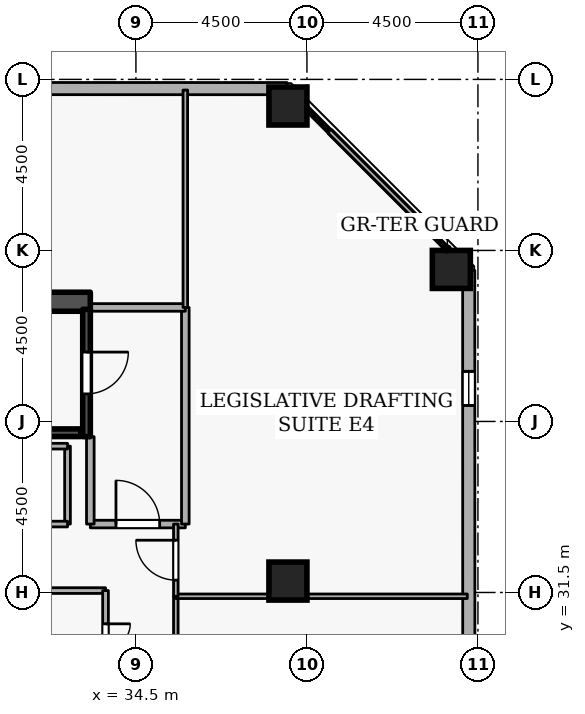
"""IFC4 building model, lengths in metres.
Left out: names, types, materials, properties, quantities, classifications, styles, units other than length and angle.
Written with IfcOpenShell. Run it as: python <this file> out.ifc"""

import sys

from ifc_helpers import new_model, si_unit, direction, frame, frame_2d, origin, origin_2d, place, context, subcontext, project, spatial, rectangle, extrude, element, fill, save


model = new_model("IFC4")
c1 = context("Model", 3, precision=1e-05, world=origin(), true_north=direction((0.0, 1.0)))
c2 = subcontext(c1, "Body", "Model", "MODEL_VIEW")
j1 = project(units=[si_unit("LENGTHUNIT", "METRE"), si_unit("PLANEANGLEUNIT", "RADIAN")], contexts=[c1])
p1 = place(None, origin())
s1 = spatial("IfcSite", under=j1, at=p1, CompositionType="ELEMENT")
p2 = place(p1, origin())
s2 = spatial("IfcBuilding", under=s1, at=p2, CompositionType="ELEMENT")
p3 = place(p2, frame((0.0, 0.0, 247.5)))
s3 = spatial("IfcBuildingStorey", under=s2, at=p3, CompositionType="ELEMENT", Elevation=247.5)
p4 = place(p3, frame((17.7, 39.15, 0.0), z_axis=(0.0, 0.0, 1.0), x_axis=(1.0, 0.0, 0.0)))
e1 = element("IfcWall", 1, at=p4, inside=s3, PredefinedType="SHEAR", context=c2, shape_type="SweptSolid", body=[
    extrude(rectangle(XDim=15.6, YDim=0.5, at=frame_2d((7.8, 0.0))), origin(), (0.0, 0.0, 1.0), 3.6),
])
for number, where, z_axis, x_axis in (
    (2, (42.8, 40.0, 0.0), (0.0, 0.0, 1.0), (1.0, 0.0, 0.0)),
    (3, (38.5, 44.3, 0.0), (0.0, 0.0, 1.0), (1.0, 0.0, 0.0)),
    (4, (38.5, 31.8, 0.0), (0.0, 0.0, 1.0), (1.0, 0.0, 0.0)),
):
    element("IfcColumn", number, at=place(p3, frame(where, z_axis=z_axis, x_axis=x_axis)), inside=s3, PredefinedType="COLUMN", context=c2, shape_type="SweptSolid", body=[
        extrude(rectangle(XDim=1.0, YDim=1.0, at=origin_2d()), origin(), (0.0, 0.0, 1.0), 3.6),
    ])
p5 = place(p3, frame((43.265, 5.819, 0.0), z_axis=(0.0, 0.0, 1.0), x_axis=(-0.000214431216, 0.99999997701, 0.0)))
e5 = element("IfcWall", 5, at=p5, inside=s3, PredefinedType="STANDARD", context=c2, shape_type="SweptSolid", body=[
    extrude(rectangle(XDim=34.156, YDim=0.32, at=frame_2d((17.078, 0.0))), origin(), (0.0, 0.0, 1.0), 2.7),
])
p6 = place(p5, frame((1.8, 0.0, 0.72)))
e6 = element("IfcOpeningElement", 6, at=p6, cuts=e5, PredefinedType="OPENING", context=c2, shape_type="SweptSolid", body=[
    extrude(rectangle(XDim=0.9, YDim=1.75, at=frame_2d((0.45, 0.875))), frame((0.0, 0.17, 0.0), z_axis=(0.0, -1.0, 0.0), x_axis=(1.0, 0.0, 0.0)), (0.0, 0.0, 1.0), 0.34),
])
p7 = place(p5, frame((11.4, 0.0, 0.72)))
e7 = element("IfcOpeningElement", 7, at=p7, cuts=e5, PredefinedType="OPENING", context=c2, shape_type="SweptSolid", body=[
    extrude(rectangle(XDim=0.9, YDim=1.75, at=frame_2d((0.45, 0.875))), frame((0.0, 0.17, 0.0), z_axis=(0.0, -1.0, 0.0), x_axis=(1.0, 0.0, 0.0)), (0.0, 0.0, 1.0), 0.34),
])
p8 = place(p5, frame((16.2, 0.0, 0.72)))
e8 = element("IfcOpeningElement", 8, at=p8, cuts=e5, PredefinedType="OPENING", context=c2, shape_type="SweptSolid", body=[
    extrude(rectangle(XDim=0.9, YDim=1.75, at=frame_2d((0.45, 0.875))), frame((0.0, 0.17, 0.0), z_axis=(0.0, -1.0, 0.0), x_axis=(1.0, 0.0, 0.0)), (0.0, 0.0, 1.0), 0.34),
])
p9 = place(p5, frame((30.6, 0.0, 0.72)))
e9 = element("IfcOpeningElement", 9, at=p9, cuts=e5, PredefinedType="OPENING", context=c2, shape_type="SweptSolid", body=[
    extrude(rectangle(XDim=0.9, YDim=1.75, at=frame_2d((0.45, 0.875))), frame((0.0, 0.17, 0.0), z_axis=(0.0, -1.0, 0.0), x_axis=(1.0, 0.0, 0.0)), (0.0, 0.0, 1.0), 0.34),
])
p10 = place(p3, frame((38.475, 44.757, 0.0), z_axis=(0.0, 0.0, 1.0), x_axis=(-0.99999997701, 0.000214431216, 0.0)))
e10 = element("IfcWall", 10, at=p10, inside=s3, PredefinedType="STANDARD", context=c2, shape_type="SweptSolid", body=[
    extrude(rectangle(XDim=34.156, YDim=0.32, at=frame_2d((17.078, 0.0))), origin(), (0.0, 0.0, 1.0), 2.7),
])
p11 = place(p10, frame((6.6, 0.0, 0.72)))
e11 = element("IfcOpeningElement", 11, at=p11, cuts=e10, PredefinedType="OPENING", context=c2, shape_type="SweptSolid", body=[
    extrude(rectangle(XDim=0.9, YDim=1.75, at=frame_2d((0.45, 0.875))), frame((0.0, 0.17, 0.0), z_axis=(0.0, -1.0, 0.0), x_axis=(1.0, 0.0, 0.0)), (0.0, 0.0, 1.0), 0.34),
])
p12 = place(p10, frame((16.2, 0.0, 0.72)))
e12 = element("IfcOpeningElement", 12, at=p12, cuts=e10, PredefinedType="OPENING", context=c2, shape_type="SweptSolid", body=[
    extrude(rectangle(XDim=0.9, YDim=1.75, at=frame_2d((0.45, 0.875))), frame((0.0, 0.17, 0.0), z_axis=(0.0, -1.0, 0.0), x_axis=(1.0, 0.0, 0.0)), (0.0, 0.0, 1.0), 0.34),
])
p13 = place(p10, frame((21.0, 0.0, 0.72)))
e13 = element("IfcOpeningElement", 13, at=p13, cuts=e10, PredefinedType="OPENING", context=c2, shape_type="SweptSolid", body=[
    extrude(rectangle(XDim=0.9, YDim=1.75, at=frame_2d((0.45, 0.875))), frame((0.0, 0.17, 0.0), z_axis=(0.0, -1.0, 0.0), x_axis=(1.0, 0.0, 0.0)), (0.0, 0.0, 1.0), 0.34),
])
p14 = place(p10, frame((30.6, 0.0, 0.72)))
e14 = element("IfcOpeningElement", 14, at=p14, cuts=e10, PredefinedType="OPENING", context=c2, shape_type="SweptSolid", body=[
    extrude(rectangle(XDim=0.9, YDim=1.75, at=frame_2d((0.45, 0.875))), frame((0.0, 0.17, 0.0), z_axis=(0.0, -1.0, 0.0), x_axis=(1.0, 0.0, 0.0)), (0.0, 0.0, 1.0), 0.34),
])
p15 = place(p3, frame((33.2, 38.95, 0.0), z_axis=(0.0, 0.0, 1.0), x_axis=(0.0, -1.0, 0.0)))
e15 = element("IfcWall", 15, at=p15, inside=s3, PredefinedType="SHEAR", context=c2, shape_type="SweptSolid", body=[
    extrude(rectangle(XDim=3.35, YDim=0.2, at=frame_2d((1.675, 0.0))), origin(), (0.0, 0.0, 1.0), 3.6),
])
p16 = place(p15, frame((1.125, 0.0, 0.0)))
e16 = element("IfcOpeningElement", 16, at=p16, cuts=e15, PredefinedType="OPENING", context=c2, shape_type="SweptSolid", body=[
    extrude(rectangle(XDim=1.1, YDim=2.1, at=frame_2d((0.55, 1.05))), frame((0.0, 0.11, 0.0), z_axis=(0.0, -1.0, 0.0), x_axis=(1.0, 0.0, 0.0)), (0.0, 0.0, 1.0), 0.22),
])
p17 = place(p3, frame((25.95, 35.703, 0.0), z_axis=(0.0, 0.0, 1.0), x_axis=(1.0, 0.0, 0.0)))
e17 = element("IfcWall", 17, at=p17, inside=s3, PredefinedType="SHEAR", context=c2, shape_type="SweptSolid", body=[
    extrude(rectangle(XDim=7.1, YDim=0.2, at=frame_2d((3.55, 0.0))), origin(), (0.0, 0.0, 1.0), 3.6),
])
p18 = place(p3, frame((33.3, 33.3, 0.0), z_axis=(0.0, 0.0, 1.0), x_axis=(1.0, 0.0, 0.0)))
e18 = element("IfcWall", 18, at=p18, inside=s3, PredefinedType="STANDARD", context=c2, shape_type="SweptSolid", body=[
    extrude(rectangle(XDim=2.5, YDim=0.2, at=frame_2d((1.25, 0.0))), origin(), (0.0, 0.0, 1.0), 3.34),
])
p19 = place(p18, frame((0.675, 0.0, 0.0)))
e19 = element("IfcOpeningElement", 19, at=p19, cuts=e18, PredefinedType="OPENING", context=c2, shape_type="SweptSolid", body=[
    extrude(rectangle(XDim=1.15, YDim=2.1, at=frame_2d((0.575, 1.05))), frame((0.0, 0.11, 0.0), z_axis=(0.0, -1.0, 0.0), x_axis=(1.0, 0.0, 0.0)), (0.0, 0.0, 1.0), 0.22),
])
p20 = place(p3, frame((35.8, 33.3, 0.0), z_axis=(0.0, 0.0, 1.0), x_axis=(0.0, 1.0, 0.0)))
e20 = element("IfcWall", 20, at=p20, inside=s3, PredefinedType="STANDARD", context=c2, shape_type="SweptSolid", body=[
    extrude(rectangle(XDim=5.7, YDim=0.2, at=frame_2d((2.85, 0.0))), origin(), (0.0, 0.0, 1.0), 3.34),
])
p21 = place(p3, frame((35.8, 39.0, 0.0), z_axis=(0.0, 0.0, 1.0), x_axis=(-1.0, 0.0, 0.0)))
e21 = element("IfcWall", 21, at=p21, inside=s3, PredefinedType="STANDARD", context=c2, shape_type="SweptSolid", body=[
    extrude(rectangle(XDim=2.5, YDim=0.2, at=frame_2d((1.25, 0.0))), origin(), (0.0, 0.0, 1.0), 3.34),
])
p22 = place(p3, frame((33.3, 35.6, 0.0), z_axis=(0.0, 0.0, 1.0), x_axis=(0.0, -1.0, 0.0)))
e22 = element("IfcWall", 22, at=p22, inside=s3, PredefinedType="STANDARD", context=c2, shape_type="SweptSolid", body=[
    extrude(rectangle(XDim=2.3, YDim=0.2, at=frame_2d((1.15, 0.0))), origin(), (0.0, 0.0, 1.0), 2.545),
])
p23 = place(p3, frame((32.7, 35.35, 0.0), z_axis=(0.0, 0.0, 1.0), x_axis=(0.0, -1.0, 0.0)))
e23 = element("IfcWall", 23, at=p23, inside=s3, PredefinedType="PARTITIONING", context=c2, shape_type="SweptSolid", body=[
    extrude(rectangle(XDim=2.05, YDim=0.15, at=frame_2d((1.025, 0.0))), origin(), (0.0, 0.0, 1.0), 2.545),
])
p24 = place(p3, frame((32.7, 33.3, 0.0), z_axis=(0.0, 0.0, 1.0), x_axis=(-1.0, 0.0, 0.0)))
e24 = element("IfcWall", 24, at=p24, inside=s3, PredefinedType="PARTITIONING", context=c2, shape_type="SweptSolid", body=[
    extrude(rectangle(XDim=2.35, YDim=0.15, at=frame_2d((1.175, 0.0))), origin(), (0.0, 0.0, 1.0), 3.34),
])
p25 = place(p24, frame((0.715, 0.0, 0.0)))
e25 = element("IfcOpeningElement", 25, at=p25, cuts=e24, PredefinedType="OPENING", context=c2, shape_type="SweptSolid", body=[
    extrude(rectangle(XDim=0.92, YDim=2.08, at=frame_2d((0.46, 1.04))), frame((0.0, 0.085, 0.0), z_axis=(0.0, -1.0, 0.0), x_axis=(1.0, 0.0, 0.0)), (0.0, 0.0, 1.0), 0.17),
])
p26 = place(p3, frame((30.35, 35.35, 0.0), z_axis=(0.0, 0.0, 1.0), x_axis=(1.0, 0.0, 0.0)))
e26 = element("IfcWall", 26, at=p26, inside=s3, PredefinedType="PARTITIONING", context=c2, shape_type="SweptSolid", body=[
    extrude(rectangle(XDim=2.35, YDim=0.15, at=frame_2d((1.175, 0.0))), origin(), (0.0, 0.0, 1.0), 3.34),
])
p27 = place(p3, frame((35.55, 26.6, 0.0), z_axis=(0.0, 0.0, 1.0), x_axis=(0.0, 1.0, 0.0)))
e27 = element("IfcWall", 27, at=p27, inside=s3, PredefinedType="PARTITIONING", context=c2, shape_type="SweptSolid", body=[
    extrude(rectangle(XDim=4.8, YDim=0.12, at=frame_2d((2.4, 0.0))), origin(), (0.0, 0.0, 1.0), 3.34),
])
p28 = place(p27, frame((1.925, 0.0, 0.0)))
e28 = element("IfcOpeningElement", 28, at=p28, cuts=e27, PredefinedType="OPENING", context=c2, shape_type="SweptSolid", body=[
    extrude(rectangle(XDim=0.95, YDim=2.1, at=frame_2d((0.475, 1.05))), frame((0.0, 0.07, 0.0), z_axis=(0.0, -1.0, 0.0), x_axis=(1.0, 0.0, 0.0)), (0.0, 0.0, 1.0), 0.14),
])
p29 = place(p3, frame((35.55, 31.4, 0.0), z_axis=(0.0, 0.0, 1.0), x_axis=(1.0, 0.0, 0.0)))
e29 = element("IfcWall", 29, at=p29, inside=s3, PredefinedType="PARTITIONING", context=c2, shape_type="SweptSolid", body=[
    extrude(rectangle(XDim=7.67, YDim=0.12, at=frame_2d((3.835, 0.0))), origin(), (0.0, 0.0, 1.0), 3.34),
])
p30 = place(p3, frame((35.8, 39.0, 0.0), z_axis=(0.0, 0.0, 1.0), x_axis=(0.0, 1.0, 0.0)))
e30 = element("IfcWall", 30, at=p30, inside=s3, PredefinedType="PARTITIONING", context=c2, shape_type="SweptSolid", body=[
    extrude(rectangle(XDim=5.72, YDim=0.12, at=frame_2d((2.86, 0.0))), origin(), (0.0, 0.0, 1.0), 3.34),
])
p31 = place(p3, frame((38.51, 44.72, 0.0), z_axis=(0.0, 0.0, 1.0), x_axis=(0.707106781187, -0.707106781187, 0.0)))
e31 = element("IfcWall", 31, at=p31, inside=s3, PredefinedType="PARTITIONING", context=c2, shape_type="SweptSolid", body=[
    extrude(rectangle(XDim=6.066, YDim=0.12, at=frame_2d((3.033, 0.0))), origin(), (0.0, 0.0, 1.0), 3.34),
])
p32 = place(p3, frame((35.55, 31.4, 0.0), z_axis=(0.0, 0.0, 1.0), x_axis=(0.0, 1.0, 0.0)))
e32 = element("IfcWall", 32, at=p32, inside=s3, PredefinedType="PARTITIONING", context=c2, shape_type="SweptSolid", body=[
    extrude(rectangle(XDim=1.9, YDim=0.12, at=frame_2d((0.95, 0.0))), origin(), (0.0, 0.0, 1.0), 3.34),
])
p33 = place(p32, frame((0.425, 0.0, 0.0)))
e33 = element("IfcOpeningElement", 33, at=p33, cuts=e32, PredefinedType="OPENING", context=c2, shape_type="SweptSolid", body=[
    extrude(rectangle(XDim=1.05, YDim=2.1, at=frame_2d((0.525, 1.05))), frame((0.0, 0.07, 0.0), z_axis=(0.0, -1.0, 0.0), x_axis=(1.0, 0.0, 0.0)), (0.0, 0.0, 1.0), 0.14),
])
p34 = place(p3, frame((30.7, 31.55, 0.0), z_axis=(0.0, 0.0, 1.0), x_axis=(1.0, 0.0, 0.0)))
e34 = element("IfcWall", 34, at=p34, inside=s3, PredefinedType="PARTITIONING", context=c2, shape_type="SweptSolid", body=[
    extrude(rectangle(XDim=3.0, YDim=0.15, at=frame_2d((1.5, 0.0))), origin(), (0.0, 0.0, 1.0), 3.34),
])
p35 = place(p3, frame((33.7, 31.55, 0.0), z_axis=(0.0, 0.0, 1.0), x_axis=(0.0, -1.0, 0.0)))
e35 = element("IfcWall", 35, at=p35, inside=s3, PredefinedType="PARTITIONING", context=c2, shape_type="SweptSolid", body=[
    extrude(rectangle(XDim=3.05, YDim=0.15, at=frame_2d((1.525, 0.0))), origin(), (0.0, 0.0, 1.0), 3.34),
])
p36 = place(p35, frame((0.875, 0.0, 0.0)))
e36 = element("IfcOpeningElement", 36, at=p36, cuts=e35, PredefinedType="OPENING", context=c2, shape_type="SweptSolid", body=[
    extrude(rectangle(XDim=1.3, YDim=2.12, at=frame_2d((0.65, 1.06))), frame((0.0, 0.085, 0.0), z_axis=(0.0, -1.0, 0.0), x_axis=(1.0, 0.0, 0.0)), (0.0, 0.0, 1.0), 0.17),
])
p37 = place(p9, origin())
e37 = element("IfcWindow", 37, at=p37, inside=s3, PartitioningType="SINGLE_PANEL", PredefinedType="WINDOW", context=c2, shape_type="SweptSolid", body=[
    extrude(rectangle(XDim=0.9, YDim=1.75, at=frame_2d((0.45, 0.875))), frame((0.0, 0.03, 0.0), z_axis=(0.0, -1.0, 0.0), x_axis=(1.0, 0.0, 0.0)), (0.0, 0.0, 1.0), 0.06),
])
fill(e9, e37)
p38 = place(p16, origin())
e38 = element("IfcDoor", 38, at=p38, inside=s3, OperationType="SINGLE_SWING_LEFT", PredefinedType="DOOR", context=c2, shape_type="SweptSolid", body=[
    extrude(rectangle(XDim=1.1, YDim=2.1, at=frame_2d((0.55, 1.05))), frame((0.0, 0.025, 0.0), z_axis=(0.0, -1.0, 0.0), x_axis=(1.0, 0.0, 0.0)), (0.0, 0.0, 1.0), 0.05),
])
fill(e16, e38)
p39 = place(p19, origin())
e39 = element("IfcDoor", 39, at=p39, inside=s3, OperationType="SINGLE_SWING_LEFT", PredefinedType="DOOR", context=c2, shape_type="SweptSolid", body=[
    extrude(rectangle(XDim=1.15, YDim=2.1, at=frame_2d((0.575, 1.05))), frame((0.0, 0.025, 0.0), z_axis=(0.0, -1.0, 0.0), x_axis=(1.0, 0.0, 0.0)), (0.0, 0.0, 1.0), 0.05),
])
fill(e19, e39)
p40 = place(p33, origin())
e40 = element("IfcDoor", 40, at=p40, inside=s3, OperationType="SINGLE_SWING_RIGHT", PredefinedType="DOOR", context=c2, shape_type="SweptSolid", body=[
    extrude(rectangle(XDim=1.05, YDim=2.1, at=frame_2d((0.525, 1.05))), frame((0.0, 0.025, 0.0), z_axis=(0.0, -1.0, 0.0), x_axis=(1.0, 0.0, 0.0)), (0.0, 0.0, 1.0), 0.05),
])
fill(e33, e40)
p41 = place(p36, origin())
e41 = element("IfcDoor", 41, at=p41, inside=s3, OperationType="DOUBLE_DOOR_SINGLE_SWING", PredefinedType="DOOR", context=c2, shape_type="SweptSolid", body=[
    extrude(rectangle(XDim=1.3, YDim=2.12, at=frame_2d((0.65, 1.06))), frame((0.0, 0.025, 0.0), z_axis=(0.0, -1.0, 0.0), x_axis=(1.0, 0.0, 0.0)), (0.0, 0.0, 1.0), 0.05),
])
fill(e36, e41)
save(model, sys.argv[1])
